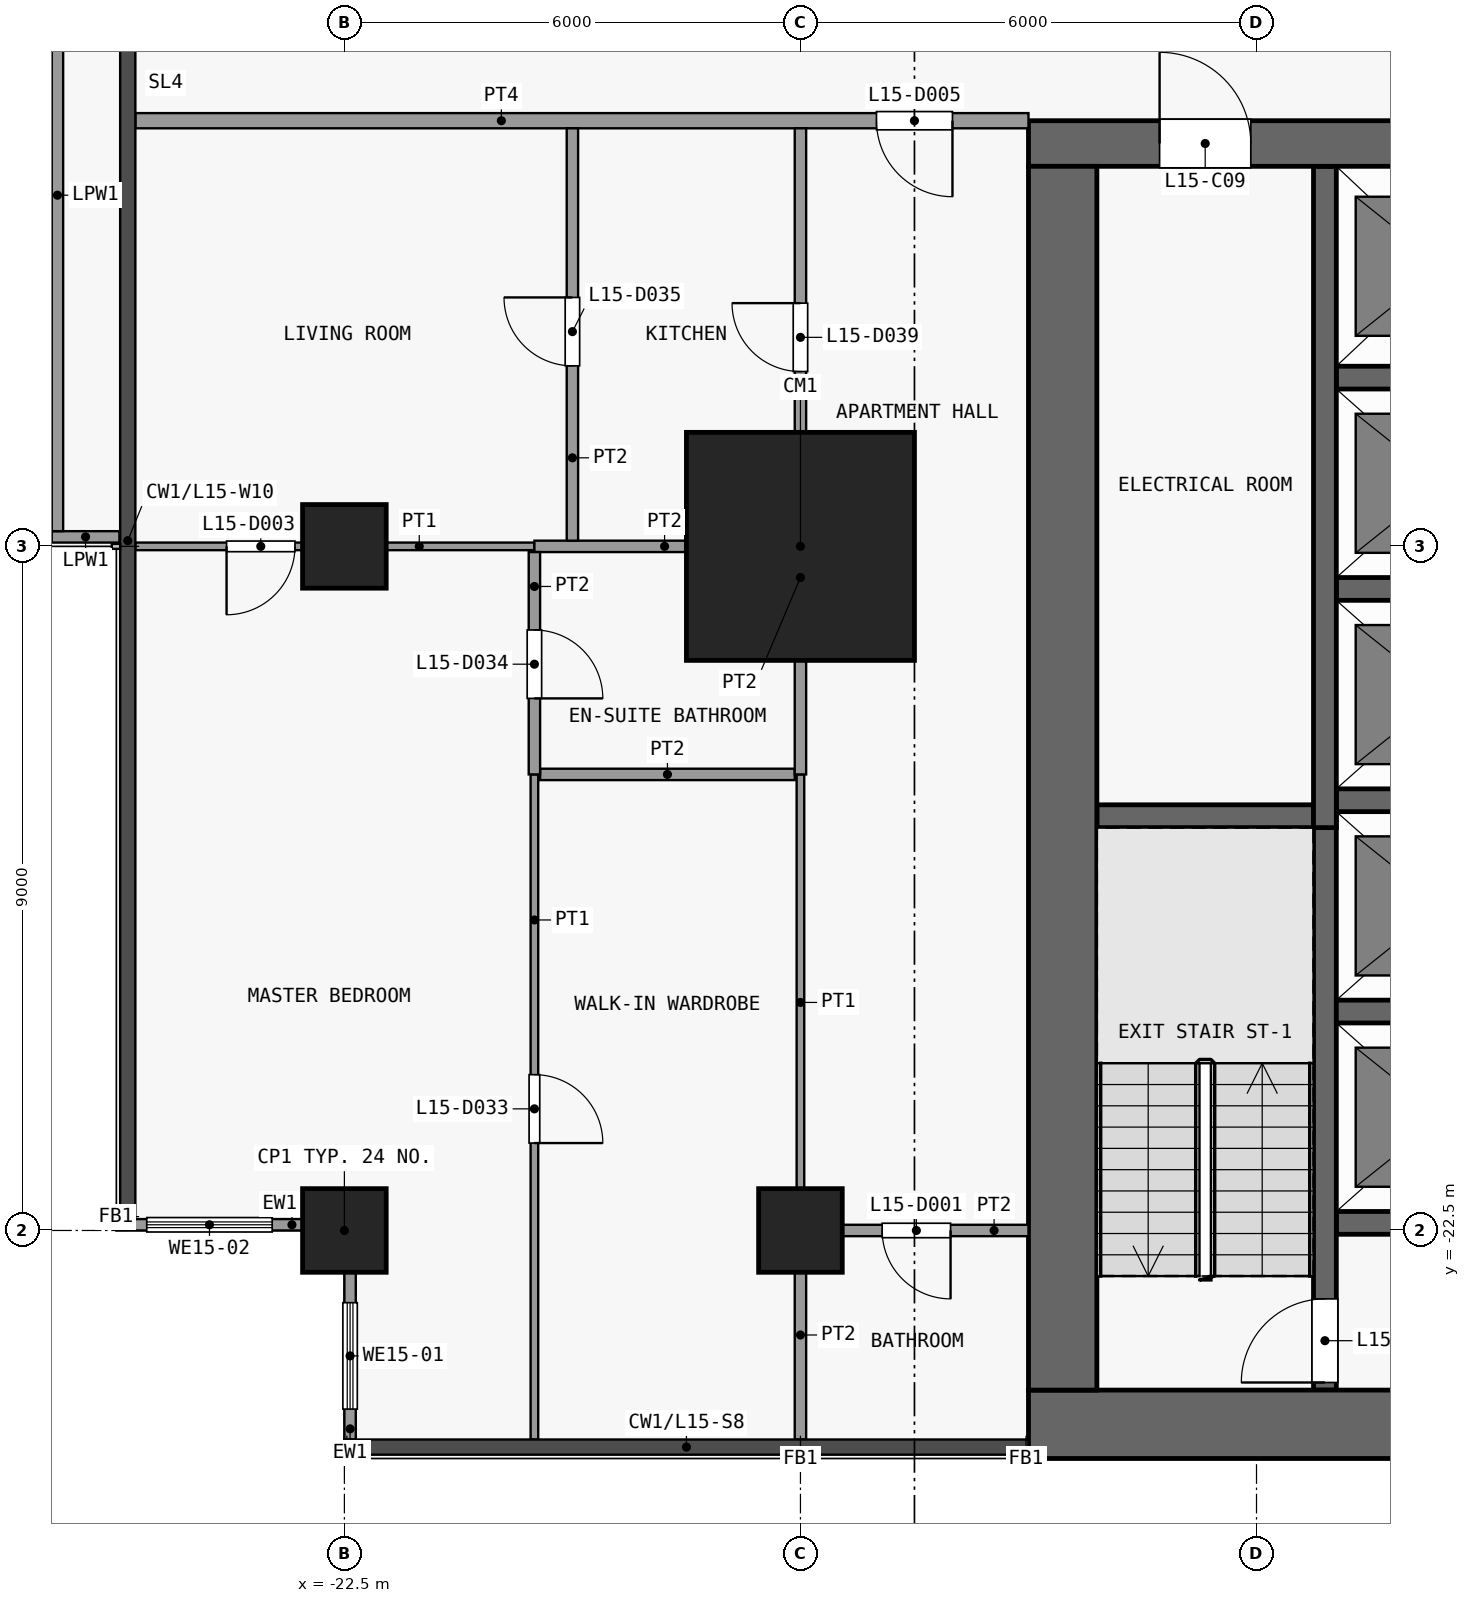
"""IFC4 building model, lengths in metres.
Left out: names, types, materials, properties, quantities, classifications, styles, units other than length and angle.
Written with IfcOpenShell. Run it as: python <this file> out.ifc"""

import sys

from ifc_helpers import new_model, si_unit, direction, frame, frame_2d, origin, origin_2d, place, context, subcontext, project, spatial, rectangle, extrude, element, fill, save


model = new_model("IFC4")
c1 = context("Model", 3, precision=1e-05, world=origin(), true_north=direction((0.0, 1.0)))
c2 = subcontext(c1, "Body", "Model", "MODEL_VIEW")
j1 = project(units=[si_unit("LENGTHUNIT", "METRE"), si_unit("PLANEANGLEUNIT", "RADIAN")], contexts=[c1])
p1 = place(None, origin())
s1 = spatial("IfcSite", under=j1, at=p1, CompositionType="ELEMENT")
p2 = place(p1, origin())
s2 = spatial("IfcBuilding", under=s1, at=p2, CompositionType="ELEMENT")
p3 = place(p2, frame((0.0, 0.0, 64.9)))
s3 = spatial("IfcBuildingStorey", under=s2, at=p3, CompositionType="ELEMENT", Elevation=64.9)
for number, where, z_axis, x_axis in (
    (1, (-22.5, -22.5, 0.0), (0.0, 0.0, 1.0), (1.0, 0.0, 0.0)),
    (2, (-22.5, -13.5, 0.0), (0.0, 0.0, 1.0), (1.0, 0.0, 0.0)),
    (3, (-16.5, -22.5, 0.0), (0.0, 0.0, 1.0), (1.0, 0.0, 0.0)),
):
    element("IfcColumn", number, at=place(p3, frame(where, z_axis=z_axis, x_axis=x_axis)), inside=s3, PredefinedType="COLUMN", context=c2, shape_type="SweptSolid", body=[
        extrude(rectangle(XDim=1.1, YDim=1.1, at=origin_2d()), origin(), (0.0, 0.0, 1.0), 3.6),
    ])
p4 = place(p3, frame((-16.5, -13.5, 0.0), z_axis=(0.0, 0.0, 1.0), x_axis=(1.0, 0.0, 0.0)))
e4 = element("IfcColumn", 4, at=p4, inside=s3, PredefinedType="COLUMN", context=c2, shape_type="SweptSolid", body=[
    extrude(rectangle(XDim=3.0, YDim=3.0, at=origin_2d()), origin(), (0.0, 0.0, 1.0), 3.6),
])
p5 = place(p3, frame((-13.5, -25.05, 0.0), z_axis=(0.0, 0.0, 1.0), x_axis=(1.0, 0.0, 0.0)))
e5 = element("IfcWall", 5, at=p5, inside=s3, PredefinedType="SHEAR", context=c2, shape_type="SweptSolid", body=[
    extrude(rectangle(XDim=27.0, YDim=0.9, at=frame_2d((13.5, 0.0))), origin(), (0.0, 0.0, 1.0), 3.3),
])
p6 = place(p3, frame((-13.5, -8.2, 0.0), z_axis=(0.0, 0.0, 1.0), x_axis=(1.0, 0.0, 0.0)))
e6 = element("IfcWall", 6, at=p6, inside=s3, PredefinedType="SHEAR", context=c2, shape_type="SweptSolid", body=[
    extrude(rectangle(XDim=27.0, YDim=0.6, at=frame_2d((13.5, 0.0))), origin(), (0.0, 0.0, 1.0), 3.3),
])
p7 = place(p6, frame((7.8, 0.0, 0.0)))
e7 = element("IfcOpeningElement", 7, at=p7, cuts=e6, PredefinedType="OPENING", context=c2, shape_type="SweptSolid", body=[
    extrude(rectangle(XDim=1.8, YDim=2.1, at=frame_2d((0.9, 1.05))), frame((0.0, 0.31, 0.0), z_axis=(0.0, -1.0, 0.0), x_axis=(1.0, 0.0, 0.0)), (0.0, 0.0, 1.0), 0.62),
])
p8 = place(p6, frame((17.4, 0.0, 0.0)))
e8 = element("IfcOpeningElement", 8, at=p8, cuts=e6, PredefinedType="OPENING", context=c2, shape_type="SweptSolid", body=[
    extrude(rectangle(XDim=1.8, YDim=2.1, at=frame_2d((0.9, 1.05))), frame((0.0, 0.31, 0.0), z_axis=(0.0, -1.0, 0.0), x_axis=(1.0, 0.0, 0.0)), (0.0, 0.0, 1.0), 0.62),
])
p9 = place(p6, frame((1.725, 0.0, 0.0)))
e9 = element("IfcOpeningElement", 9, at=p9, cuts=e6, PredefinedType="OPENING", context=c2, shape_type="SweptSolid", body=[
    extrude(rectangle(XDim=1.2, YDim=2.1, at=frame_2d((0.6, 1.05))), frame((0.0, 0.31, 0.0), z_axis=(0.0, -1.0, 0.0), x_axis=(1.0, 0.0, 0.0)), (0.0, 0.0, 1.0), 0.62),
])
p10 = place(p6, frame((23.375, 0.0, 0.0)))
e10 = element("IfcOpeningElement", 10, at=p10, cuts=e6, PredefinedType="OPENING", context=c2, shape_type="SweptSolid", body=[
    extrude(rectangle(XDim=0.9, YDim=2.1, at=frame_2d((0.45, 1.05))), frame((0.0, 0.31, 0.0), z_axis=(0.0, -1.0, 0.0), x_axis=(1.0, 0.0, 0.0)), (0.0, 0.0, 1.0), 0.62),
])
p11 = place(p3, frame((-13.05, -24.6, 0.0), z_axis=(0.0, 0.0, 1.0), x_axis=(0.0, 1.0, 0.0)))
e11 = element("IfcWall", 11, at=p11, inside=s3, PredefinedType="SHEAR", context=c2, shape_type="SweptSolid", body=[
    extrude(rectangle(XDim=16.1, YDim=0.9, at=frame_2d((8.05, 0.0))), origin(), (0.0, 0.0, 1.0), 3.3),
])
for number, where, z_axis, x_axis in (
    (12, (-9.45, -22.4, 0.0), (0.0, 0.0, 1.0), (1.0, 0.0, 0.0)),
    (13, (-9.45, -19.62, 0.0), (0.0, 0.0, 1.0), (1.0, 0.0, 0.0)),
):
    element("IfcWall", number, at=place(p3, frame(where, z_axis=z_axis, x_axis=x_axis)), inside=s3, PredefinedType="SHEAR", context=c2, shape_type="SweptSolid", body=[
        extrude(rectangle(XDim=2.8, YDim=0.3, at=frame_2d((1.4, 0.0))), origin(), (0.0, 0.0, 1.0), 3.3),
    ])
p12 = place(p3, frame((-12.6, -17.05, 0.0), z_axis=(0.0, 0.0, 1.0), x_axis=(1.0, 0.0, 0.0)))
e14 = element("IfcWall", 14, at=p12, inside=s3, PredefinedType="SHEAR", context=c2, shape_type="SweptSolid", body=[
    extrude(rectangle(XDim=2.85, YDim=0.3, at=frame_2d((1.425, 0.0))), origin(), (0.0, 0.0, 1.0), 3.3),
])
for number, where, z_axis, x_axis in (
    (15, (-9.45, -16.84, 0.0), (0.0, 0.0, 1.0), (1.0, 0.0, 0.0)),
    (16, (-9.45, -14.06, 0.0), (0.0, 0.0, 1.0), (1.0, 0.0, 0.0)),
    (17, (-9.45, -11.28, 0.0), (0.0, 0.0, 1.0), (1.0, 0.0, 0.0)),
):
    element("IfcWall", number, at=place(p3, frame(where, z_axis=z_axis, x_axis=x_axis)), inside=s3, PredefinedType="SHEAR", context=c2, shape_type="SweptSolid", body=[
        extrude(rectangle(XDim=2.8, YDim=0.3, at=frame_2d((1.4, 0.0))), origin(), (0.0, 0.0, 1.0), 3.3),
    ])
p13 = place(p3, frame((-9.6, -24.6, 0.0), z_axis=(0.0, 0.0, 1.0), x_axis=(0.0, 1.0, 0.0)))
e18 = element("IfcWall", 18, at=p13, inside=s3, PredefinedType="SHEAR", context=c2, shape_type="SweptSolid", body=[
    extrude(rectangle(XDim=7.7, YDim=0.3, at=frame_2d((3.85, 0.0))), origin(), (0.0, 0.0, 1.0), 3.3),
])
p14 = place(p13, frame((0.1, 0.0, 0.0)))
e19 = element("IfcOpeningElement", 19, at=p14, cuts=e18, PredefinedType="OPENING", context=c2, shape_type="SweptSolid", body=[
    extrude(rectangle(XDim=1.1, YDim=2.1, at=frame_2d((0.55, 1.05))), frame((0.0, 0.16, 0.0), z_axis=(0.0, -1.0, 0.0), x_axis=(1.0, 0.0, 0.0)), (0.0, 0.0, 1.0), 0.32),
])
p15 = place(p3, frame((-9.6, -17.2, 0.0), z_axis=(0.0, 0.0, 1.0), x_axis=(0.0, 1.0, 0.0)))
e20 = element("IfcWall", 20, at=p15, inside=s3, PredefinedType="SHEAR", context=c2, shape_type="SweptSolid", body=[
    extrude(rectangle(XDim=8.7, YDim=0.3, at=frame_2d((4.35, 0.0))), origin(), (0.0, 0.0, 1.0), 3.3),
])
p16 = place(p3, frame((-22.425, -25.25, 0.0), z_axis=(0.0, 0.0, 1.0), x_axis=(0.0, 1.0, 0.0)))
e21 = element("IfcWall", 21, at=p16, inside=s3, PredefinedType="SOLIDWALL", context=c2, shape_type="SweptSolid", body=[
    extrude(rectangle(XDim=2.2, YDim=0.15, at=frame_2d((1.1, 0.0))), origin(), (0.0, 0.0, 1.0), 3.3),
])
p17 = place(p16, frame((0.4, 0.0, 0.9)))
e22 = element("IfcOpeningElement", 22, at=p17, cuts=e21, PredefinedType="OPENING", context=c2, shape_type="SweptSolid", body=[
    extrude(rectangle(XDim=1.4, YDim=2.4, at=frame_2d((0.7, 1.2))), frame((0.0, 0.085, 0.0), z_axis=(0.0, -1.0, 0.0), x_axis=(1.0, 0.0, 0.0)), (0.0, 0.0, 1.0), 0.17),
])
p18 = place(p3, frame((-23.05, -22.425, 0.0), z_axis=(0.0, 0.0, 1.0), x_axis=(-1.0, 0.0, 0.0)))
e23 = element("IfcWall", 23, at=p18, inside=s3, PredefinedType="SOLIDWALL", context=c2, shape_type="SweptSolid", body=[
    extrude(rectangle(XDim=2.45, YDim=0.15, at=frame_2d((1.225, 0.0))), origin(), (0.0, 0.0, 1.0), 3.3),
])
p19 = place(p18, frame((0.4, 0.0, 0.9)))
e24 = element("IfcOpeningElement", 24, at=p19, cuts=e23, PredefinedType="OPENING", context=c2, shape_type="SweptSolid", body=[
    extrude(rectangle(XDim=1.65, YDim=2.4, at=frame_2d((0.825, 1.2))), frame((0.0, 0.085, 0.0), z_axis=(0.0, -1.0, 0.0), x_axis=(1.0, 0.0, 0.0)), (0.0, 0.0, 1.0), 0.17),
])
p20 = place(p3, frame((-25.46, -13.375, 0.0), z_axis=(0.0, 0.0, 1.0), x_axis=(-1.0, 0.0, 0.0)))
e25 = element("IfcWall", 25, at=p20, inside=s3, PredefinedType="PARAPET", context=c2, shape_type="SweptSolid", body=[
    extrude(rectangle(XDim=0.89, YDim=0.15, at=frame_2d((0.445, 0.0))), origin(), (0.0, 0.0, 1.0), 1.15),
])
p21 = place(p3, frame((-26.275, -13.3, 0.0), z_axis=(0.0, 0.0, 1.0), x_axis=(0.0, 1.0, 0.0)))
e26 = element("IfcWall", 26, at=p21, inside=s3, PredefinedType="PARAPET", context=c2, shape_type="SweptSolid", body=[
    extrude(rectangle(XDim=8.84, YDim=0.15, at=frame_2d((4.42, 0.0))), origin(), (0.0, 0.0, 1.0), 1.15),
])
p22 = place(p3, frame((-16.425, -22.5, 0.0), z_axis=(0.0, 0.0, 1.0), x_axis=(1.0, 0.0, 0.0)))
e27 = element("IfcWall", 27, at=p22, inside=s3, PredefinedType="PARTITIONING", context=c2, shape_type="SweptSolid", body=[
    extrude(rectangle(XDim=2.925, YDim=0.15, at=frame_2d((1.462, 0.0))), origin(), (0.0, 0.0, 1.0), 3.3),
])
p23 = place(p22, frame((1.0, 0.0, 0.0)))
e28 = element("IfcOpeningElement", 28, at=p23, cuts=e27, PredefinedType="OPENING", context=c2, shape_type="SweptSolid", body=[
    extrude(rectangle(XDim=0.9, YDim=2.1, at=frame_2d((0.45, 1.05))), frame((0.0, 0.085, 0.0), z_axis=(0.0, -1.0, 0.0), x_axis=(1.0, 0.0, 0.0)), (0.0, 0.0, 1.0), 0.17),
])
p24 = place(p3, frame((-19.925, -16.5, 0.0), z_axis=(0.0, 0.0, 1.0), x_axis=(1.0, 0.0, 0.0)))
e29 = element("IfcWall", 29, at=p24, inside=s3, PredefinedType="PARTITIONING", context=c2, shape_type="SweptSolid", body=[
    extrude(rectangle(XDim=3.35, YDim=0.15, at=frame_2d((1.675, 0.0))), origin(), (0.0, 0.0, 1.0), 3.3),
])
p25 = place(p3, frame((-25.25, -13.5, 0.0), z_axis=(0.0, 0.0, 1.0), x_axis=(1.0, 0.0, 0.0)))
e30 = element("IfcWall", 30, at=p25, inside=s3, PredefinedType="PARTITIONING", context=c2, shape_type="SweptSolid", body=[
    extrude(rectangle(XDim=5.25, YDim=0.1, at=frame_2d((2.625, 0.0))), origin(), (0.0, 0.0, 1.0), 3.3),
])
p26 = place(p25, frame((1.2, 0.0, 0.0)))
e31 = element("IfcOpeningElement", 31, at=p26, cuts=e30, PredefinedType="OPENING", context=c2, shape_type="SweptSolid", body=[
    extrude(rectangle(XDim=0.9, YDim=2.1, at=frame_2d((0.45, 1.05))), frame((0.0, 0.06, 0.0), z_axis=(0.0, -1.0, 0.0), x_axis=(1.0, 0.0, 0.0)), (0.0, 0.0, 1.0), 0.12),
])
p27 = place(p3, frame((-20.0, -13.5, 0.0), z_axis=(0.0, 0.0, 1.0), x_axis=(1.0, 0.0, 0.0)))
e32 = element("IfcWall", 32, at=p27, inside=s3, PredefinedType="PARTITIONING", context=c2, shape_type="SweptSolid", body=[
    extrude(rectangle(XDim=3.425, YDim=0.15, at=frame_2d((1.712, 0.0))), origin(), (0.0, 0.0, 1.0), 3.3),
])
p28 = place(p3, frame((-25.25, -7.9, 0.0), z_axis=(0.0, 0.0, 1.0), x_axis=(1.0, 0.0, 0.0)))
e33 = element("IfcWall", 33, at=p28, inside=s3, PredefinedType="PARTITIONING", context=c2, shape_type="SweptSolid", body=[
    extrude(rectangle(XDim=11.75, YDim=0.2, at=frame_2d((5.875, 0.0))), origin(), (0.0, 0.0, 1.0), 3.3),
])
p29 = place(p28, frame((9.75, 0.0, 0.0)))
e34 = element("IfcOpeningElement", 34, at=p29, cuts=e33, PredefinedType="OPENING", context=c2, shape_type="SweptSolid", body=[
    extrude(rectangle(XDim=1.0, YDim=2.1, at=frame_2d((0.5, 1.05))), frame((0.0, 0.11, 0.0), z_axis=(0.0, -1.0, 0.0), x_axis=(1.0, 0.0, 0.0)), (0.0, 0.0, 1.0), 0.22),
])
p30 = place(p3, frame((-20.0, -25.25, 0.0), z_axis=(0.0, 0.0, 1.0), x_axis=(0.0, 1.0, 0.0)))
e35 = element("IfcWall", 35, at=p30, inside=s3, PredefinedType="PARTITIONING", context=c2, shape_type="SweptSolid", body=[
    extrude(rectangle(XDim=8.75, YDim=0.1, at=frame_2d((4.375, 0.0))), origin(), (0.0, 0.0, 1.0), 3.3),
])
p31 = place(p30, frame((3.9, 0.0, 0.0)))
e36 = element("IfcOpeningElement", 36, at=p31, cuts=e35, PredefinedType="OPENING", context=c2, shape_type="SweptSolid", body=[
    extrude(rectangle(XDim=0.9, YDim=2.1, at=frame_2d((0.45, 1.05))), frame((0.0, 0.06, 0.0), z_axis=(0.0, -1.0, 0.0), x_axis=(1.0, 0.0, 0.0)), (0.0, 0.0, 1.0), 0.12),
])
p32 = place(p3, frame((-20.0, -16.5, 0.0), z_axis=(0.0, 0.0, 1.0), x_axis=(0.0, 1.0, 0.0)))
e37 = element("IfcWall", 37, at=p32, inside=s3, PredefinedType="PARTITIONING", context=c2, shape_type="SweptSolid", body=[
    extrude(rectangle(XDim=2.925, YDim=0.15, at=frame_2d((1.462, 0.0))), origin(), (0.0, 0.0, 1.0), 3.3),
])
p33 = place(p32, frame((1.0, 0.0, 0.0)))
e38 = element("IfcOpeningElement", 38, at=p33, cuts=e37, PredefinedType="OPENING", context=c2, shape_type="SweptSolid", body=[
    extrude(rectangle(XDim=0.9, YDim=2.1, at=frame_2d((0.45, 1.05))), frame((0.0, 0.085, 0.0), z_axis=(0.0, -1.0, 0.0), x_axis=(1.0, 0.0, 0.0)), (0.0, 0.0, 1.0), 0.17),
])
p34 = place(p3, frame((-19.5, -13.425, 0.0), z_axis=(0.0, 0.0, 1.0), x_axis=(0.0, 1.0, 0.0)))
e39 = element("IfcWall", 39, at=p34, inside=s3, PredefinedType="PARTITIONING", context=c2, shape_type="SweptSolid", body=[
    extrude(rectangle(XDim=5.425, YDim=0.15, at=frame_2d((2.712, 0.0))), origin(), (0.0, 0.0, 1.0), 3.3),
])
p35 = place(p34, frame((2.3, 0.0, 0.0)))
e40 = element("IfcOpeningElement", 40, at=p35, cuts=e39, PredefinedType="OPENING", context=c2, shape_type="SweptSolid", body=[
    extrude(rectangle(XDim=0.9, YDim=2.1, at=frame_2d((0.45, 1.05))), frame((0.0, 0.085, 0.0), z_axis=(0.0, -1.0, 0.0), x_axis=(1.0, 0.0, 0.0)), (0.0, 0.0, 1.0), 0.17),
])
p36 = place(p3, frame((-16.5, -22.5, 0.0), z_axis=(0.0, 0.0, 1.0), x_axis=(0.0, 1.0, 0.0)))
e41 = element("IfcWall", 41, at=p36, inside=s3, PredefinedType="PARTITIONING", context=c2, shape_type="SweptSolid", body=[
    extrude(rectangle(XDim=6.0, YDim=0.1, at=frame_2d((3.0, 0.0))), origin(), (0.0, 0.0, 1.0), 3.3),
])
p37 = place(p3, frame((-16.5, -25.25, 0.0), z_axis=(0.0, 0.0, 1.0), x_axis=(0.0, 1.0, 0.0)))
e42 = element("IfcWall", 42, at=p37, inside=s3, PredefinedType="PARTITIONING", context=c2, shape_type="SweptSolid", body=[
    extrude(rectangle(XDim=2.75, YDim=0.15, at=frame_2d((1.375, 0.0))), origin(), (0.0, 0.0, 1.0), 3.3),
])
p38 = place(p3, frame((-16.5, -16.5, 0.0), z_axis=(0.0, 0.0, 1.0), x_axis=(0.0, 1.0, 0.0)))
e43 = element("IfcWall", 43, at=p38, inside=s3, PredefinedType="PARTITIONING", context=c2, shape_type="SweptSolid", body=[
    extrude(rectangle(XDim=8.5, YDim=0.15, at=frame_2d((4.25, 0.0))), origin(), (0.0, 0.0, 1.0), 3.3),
])
p39 = place(p38, frame((5.3, 0.0, 0.0)))
e44 = element("IfcOpeningElement", 44, at=p39, cuts=e43, PredefinedType="OPENING", context=c2, shape_type="SweptSolid", body=[
    extrude(rectangle(XDim=0.9, YDim=2.1, at=frame_2d((0.45, 1.05))), frame((0.0, 0.085, 0.0), z_axis=(0.0, -1.0, 0.0), x_axis=(1.0, 0.0, 0.0)), (0.0, 0.0, 1.0), 0.17),
])
p40 = place(p9, origin())
e45 = element("IfcDoor", 45, at=p40, inside=s3, OperationType="SINGLE_SWING_LEFT", PredefinedType="DOOR", context=c2, shape_type="SweptSolid", body=[
    extrude(rectangle(XDim=1.2, YDim=2.1, at=frame_2d((0.6, 1.05))), frame((0.0, 0.025, 0.0), z_axis=(0.0, -1.0, 0.0), x_axis=(1.0, 0.0, 0.0)), (0.0, 0.0, 1.0), 0.05),
])
fill(e9, e45)
p41 = place(p14, origin())
e46 = element("IfcDoor", 46, at=p41, inside=s3, OperationType="SINGLE_SWING_LEFT", PredefinedType="DOOR", context=c2, shape_type="SweptSolid", body=[
    extrude(rectangle(XDim=1.1, YDim=2.1, at=frame_2d((0.55, 1.05))), frame((0.0, 0.025, 0.0), z_axis=(0.0, -1.0, 0.0), x_axis=(1.0, 0.0, 0.0)), (0.0, 0.0, 1.0), 0.05),
])
fill(e19, e46)
p42 = place(p17, origin())
e47 = element("IfcWindow", 47, at=p42, inside=s3, PartitioningType="SINGLE_PANEL", PredefinedType="WINDOW", context=c2, shape_type="SweptSolid", body=[
    extrude(rectangle(XDim=1.4, YDim=2.4, at=frame_2d((0.7, 1.2))), frame((0.0, 0.03, 0.0), z_axis=(0.0, -1.0, 0.0), x_axis=(1.0, 0.0, 0.0)), (0.0, 0.0, 1.0), 0.06),
])
fill(e22, e47)
p43 = place(p19, origin())
e48 = element("IfcWindow", 48, at=p43, inside=s3, PartitioningType="SINGLE_PANEL", PredefinedType="WINDOW", context=c2, shape_type="SweptSolid", body=[
    extrude(rectangle(XDim=1.65, YDim=2.4, at=frame_2d((0.825, 1.2))), frame((0.0, 0.03, 0.0), z_axis=(0.0, -1.0, 0.0), x_axis=(1.0, 0.0, 0.0)), (0.0, 0.0, 1.0), 0.06),
])
fill(e24, e48)
p44 = place(p23, origin())
e49 = element("IfcDoor", 49, at=p44, inside=s3, OperationType="SINGLE_SWING_RIGHT", PredefinedType="DOOR", context=c2, shape_type="SweptSolid", body=[
    extrude(rectangle(XDim=0.9, YDim=2.1, at=frame_2d((0.45, 1.05))), frame((0.0, 0.025, 0.0), z_axis=(0.0, -1.0, 0.0), x_axis=(1.0, 0.0, 0.0)), (0.0, 0.0, 1.0), 0.05),
])
fill(e28, e49)
p45 = place(p26, origin())
e50 = element("IfcDoor", 50, at=p45, inside=s3, OperationType="SINGLE_SWING_LEFT", PredefinedType="DOOR", context=c2, shape_type="SweptSolid", body=[
    extrude(rectangle(XDim=0.9, YDim=2.1, at=frame_2d((0.45, 1.05))), frame((0.0, 0.025, 0.0), z_axis=(0.0, -1.0, 0.0), x_axis=(1.0, 0.0, 0.0)), (0.0, 0.0, 1.0), 0.05),
])
fill(e31, e50)
p46 = place(p29, origin())
e51 = element("IfcDoor", 51, at=p46, inside=s3, OperationType="SINGLE_SWING_RIGHT", PredefinedType="DOOR", context=c2, shape_type="SweptSolid", body=[
    extrude(rectangle(XDim=1.0, YDim=2.1, at=frame_2d((0.5, 1.05))), frame((0.0, 0.025, 0.0), z_axis=(0.0, -1.0, 0.0), x_axis=(1.0, 0.0, 0.0)), (0.0, 0.0, 1.0), 0.05),
])
fill(e34, e51)
p47 = place(p31, origin())
e52 = element("IfcDoor", 52, at=p47, inside=s3, OperationType="SINGLE_SWING_LEFT", PredefinedType="DOOR", context=c2, shape_type="SweptSolid", body=[
    extrude(rectangle(XDim=0.9, YDim=2.1, at=frame_2d((0.45, 1.05))), frame((0.0, 0.025, 0.0), z_axis=(0.0, -1.0, 0.0), x_axis=(1.0, 0.0, 0.0)), (0.0, 0.0, 1.0), 0.05),
])
fill(e36, e52)
p48 = place(p33, origin())
e53 = element("IfcDoor", 53, at=p48, inside=s3, OperationType="SINGLE_SWING_LEFT", PredefinedType="DOOR", context=c2, shape_type="SweptSolid", body=[
    extrude(rectangle(XDim=0.9, YDim=2.1, at=frame_2d((0.45, 1.05))), frame((0.0, 0.025, 0.0), z_axis=(0.0, -1.0, 0.0), x_axis=(1.0, 0.0, 0.0)), (0.0, 0.0, 1.0), 0.05),
])
fill(e38, e53)
p49 = place(p35, origin())
e54 = element("IfcDoor", 54, at=p49, inside=s3, OperationType="SINGLE_SWING_LEFT", PredefinedType="DOOR", context=c2, shape_type="SweptSolid", body=[
    extrude(rectangle(XDim=0.9, YDim=2.1, at=frame_2d((0.45, 1.05))), frame((0.0, 0.025, 0.0), z_axis=(0.0, -1.0, 0.0), x_axis=(1.0, 0.0, 0.0)), (0.0, 0.0, 1.0), 0.05),
])
fill(e40, e54)
p50 = place(p39, origin())
e55 = element("IfcDoor", 55, at=p50, inside=s3, OperationType="SINGLE_SWING_LEFT", PredefinedType="DOOR", context=c2, shape_type="SweptSolid", body=[
    extrude(rectangle(XDim=0.9, YDim=2.1, at=frame_2d((0.45, 1.05))), frame((0.0, 0.025, 0.0), z_axis=(0.0, -1.0, 0.0), x_axis=(1.0, 0.0, 0.0)), (0.0, 0.0, 1.0), 0.05),
])
fill(e44, e55)
save(model, sys.argv[1])
